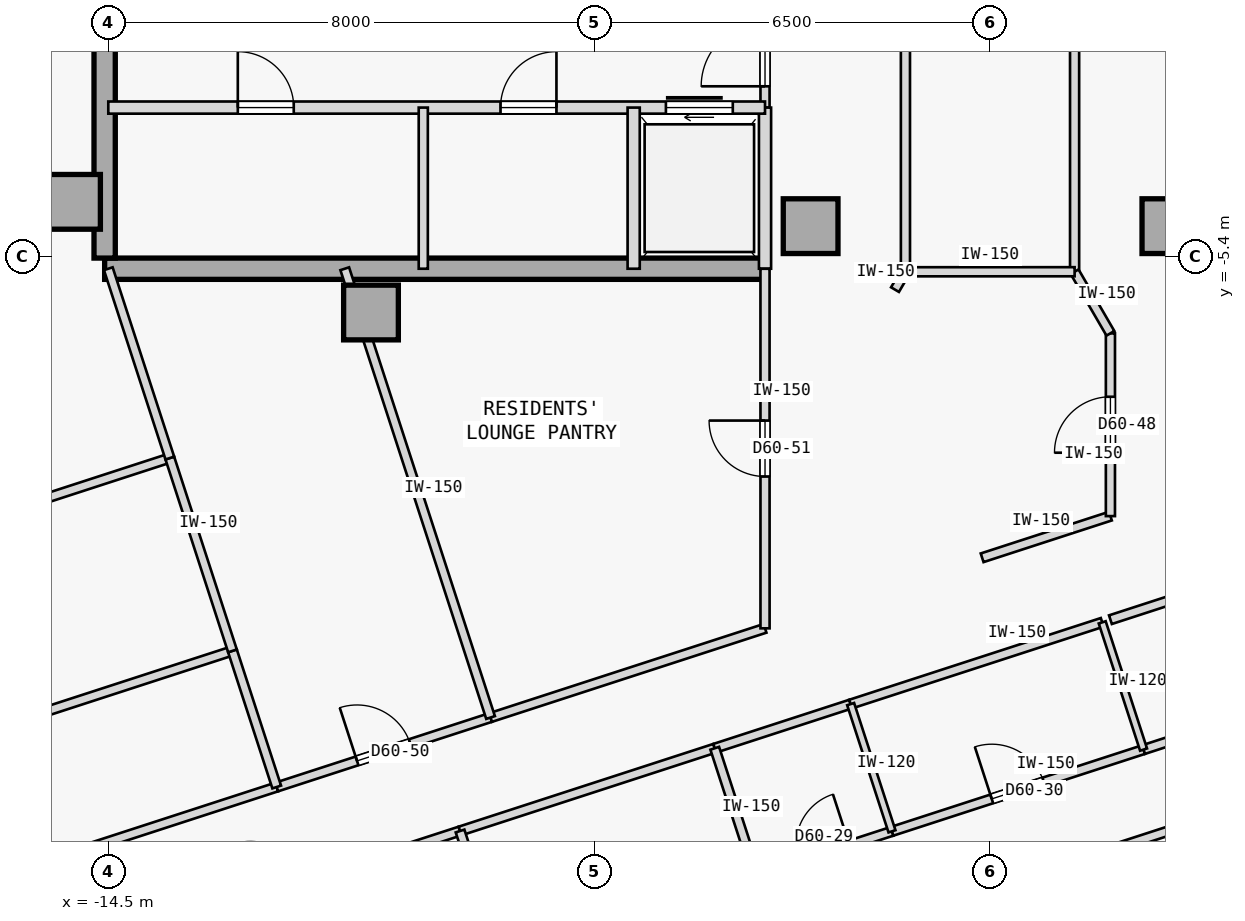
"""IFC4 building model, lengths in metres.
Left out: names, types, materials, properties, quantities, classifications, styles, units other than length and angle.
Written with IfcOpenShell. Run it as: python <this file> out.ifc"""

import sys

from ifc_helpers import new_model, si_unit, direction, frame, frame_2d, origin, origin_2d, place, context, subcontext, project, spatial, rectangle, extrude, element, fill, save


model = new_model("IFC4")
c1 = context("Model", 3, precision=1e-05, world=origin(), true_north=direction((0.0, 1.0)))
c2 = subcontext(c1, "Body", "Model", "MODEL_VIEW")
j1 = project(units=[si_unit("LENGTHUNIT", "METRE"), si_unit("PLANEANGLEUNIT", "RADIAN")], contexts=[c1])
p1 = place(None, origin())
s1 = spatial("IfcSite", under=j1, at=p1, CompositionType="ELEMENT")
p2 = place(p1, origin())
s2 = spatial("IfcBuilding", under=s1, at=p2, CompositionType="ELEMENT")
p3 = place(p2, frame((0.0, 0.0, 227.65)))
s3 = spatial("IfcBuildingStorey", under=s2, at=p3, CompositionType="ELEMENT", Elevation=227.65)
for number, where, z_axis, x_axis in (
    (1, (-15.08, -4.5, 0.0), (0.0, 0.0, 1.0), (1.0, 0.0, 0.0)),
    (2, (-10.18, -6.32, 0.0), (0.0, 0.0, 1.0), (1.0, 0.0, 0.0)),
    (3, (-2.95, -4.9, 0.0), (0.0, 0.0, 1.0), (1.0, 0.0, 0.0)),
    (4, (2.95, -4.9, 0.0), (0.0, 0.0, 1.0), (1.0, 0.0, 0.0)),
):
    element("IfcColumn", number, at=place(p3, frame(where, z_axis=z_axis, x_axis=x_axis)), inside=s3, PredefinedType="COLUMN", context=c2, shape_type="SweptSolid", body=[
        extrude(rectangle(XDim=0.9, YDim=0.9, at=origin_2d()), origin(), (0.0, 0.0, 1.0), 3.35),
    ])
p4 = place(p3, frame((-14.56, -5.6, 0.0), z_axis=(0.0, 0.0, 1.0), x_axis=(1.0, 0.0, 0.0)))
e5 = element("IfcWall", 5, at=p4, inside=s3, PredefinedType="SHEAR", context=c2, shape_type="SweptSolid", body=[
    extrude(rectangle(XDim=10.86, YDim=0.35, at=frame_2d((5.43, 0.0))), origin(), (0.0, 0.0, 1.0), 3.125),
])
p5 = place(p3, frame((-14.56, -5.425, 0.0), z_axis=(0.0, 0.0, 1.0), x_axis=(0.0, 1.0, 0.0)))
e6 = element("IfcWall", 6, at=p5, inside=s3, PredefinedType="SHEAR", context=c2, shape_type="SweptSolid", body=[
    extrude(rectangle(XDim=10.85, YDim=0.35, at=frame_2d((5.425, 0.0))), origin(), (0.0, 0.0, 1.0), 3.125),
])
p6 = place(p3, frame((-3.7, -2.95, 0.0), z_axis=(0.0, 0.0, 1.0), x_axis=(0.0, 1.0, 0.0)))
e7 = element("IfcWall", 7, at=p6, inside=s3, PredefinedType="PARTITIONING", context=c2, shape_type="SweptSolid", body=[
    extrude(rectangle(XDim=1.8, YDim=0.15, at=frame_2d((0.9, 0.0))), origin(), (0.0, 0.0, 1.0), 3.125),
])
p7 = place(p6, frame((0.35, 0.0, 0.0)))
e8 = element("IfcOpeningElement", 8, at=p7, cuts=e7, PredefinedType="OPENING", context=c2, shape_type="SweptSolid", body=[
    extrude(rectangle(XDim=1.05, YDim=2.18, at=frame_2d((0.525, 1.09))), frame((0.0, 0.085, 0.0), z_axis=(0.0, -1.0, 0.0), x_axis=(1.0, 0.0, 0.0)), (0.0, 0.0, 1.0), 0.17),
])
p8 = place(p3, frame((-3.7, -5.6, 0.0), z_axis=(0.0, 0.0, 1.0), x_axis=(0.0, 1.0, 0.0)))
e9 = element("IfcWall", 9, at=p8, inside=s3, PredefinedType="STANDARD", context=c2, shape_type="SweptSolid", body=[
    extrude(rectangle(XDim=2.65, YDim=0.2, at=frame_2d((1.325, 0.0))), origin(), (0.0, 0.0, 1.0), 3.125),
])
p9 = place(p3, frame((-14.5, -2.95, 0.0), z_axis=(0.0, 0.0, 1.0), x_axis=(1.0, 0.0, 0.0)))
e10 = element("IfcWall", 10, at=p9, inside=s3, PredefinedType="STANDARD", context=c2, shape_type="SweptSolid", body=[
    extrude(rectangle(XDim=10.8, YDim=0.2, at=frame_2d((5.4, 0.0))), origin(), (0.0, 0.0, 1.0), 3.125),
])
p10 = place(p9, frame((9.17, 0.0, 0.0)))
e11 = element("IfcOpeningElement", 11, at=p10, cuts=e10, PredefinedType="OPENING", context=c2, shape_type="SweptSolid", body=[
    extrude(rectangle(XDim=1.1, YDim=2.15, at=frame_2d((0.55, 1.075))), frame((0.0, 0.11, 0.0), z_axis=(0.0, -1.0, 0.0), x_axis=(1.0, 0.0, 0.0)), (0.0, 0.0, 1.0), 0.22),
])
p11 = place(p9, frame((2.13, 0.0, 0.0)))
e12 = element("IfcOpeningElement", 12, at=p11, cuts=e10, PredefinedType="OPENING", context=c2, shape_type="SweptSolid", body=[
    extrude(rectangle(XDim=0.92, YDim=2.15, at=frame_2d((0.46, 1.075))), frame((0.0, 0.11, 0.0), z_axis=(0.0, -1.0, 0.0), x_axis=(1.0, 0.0, 0.0)), (0.0, 0.0, 1.0), 0.22),
])
p12 = place(p9, frame((6.45, 0.0, 0.0)))
e13 = element("IfcOpeningElement", 13, at=p12, cuts=e10, PredefinedType="OPENING", context=c2, shape_type="SweptSolid", body=[
    extrude(rectangle(XDim=0.92, YDim=2.15, at=frame_2d((0.46, 1.075))), frame((0.0, 0.11, 0.0), z_axis=(0.0, -1.0, 0.0), x_axis=(1.0, 0.0, 0.0)), (0.0, 0.0, 1.0), 0.22),
])
p13 = place(p3, frame((-5.86, -5.6, 0.0), z_axis=(0.0, 0.0, 1.0), x_axis=(0.0, 1.0, 0.0)))
e14 = element("IfcWall", 14, at=p13, inside=s3, PredefinedType="STANDARD", context=c2, shape_type="SweptSolid", body=[
    extrude(rectangle(XDim=2.65, YDim=0.2, at=frame_2d((1.325, 0.0))), origin(), (0.0, 0.0, 1.0), 3.125),
])
p14 = place(p3, frame((-9.32, -5.6, 0.0), z_axis=(0.0, 0.0, 1.0), x_axis=(0.0, 1.0, 0.0)))
e15 = element("IfcWall", 15, at=p14, inside=s3, PredefinedType="PARTITIONING", context=c2, shape_type="SweptSolid", body=[
    extrude(rectangle(XDim=2.65, YDim=0.15, at=frame_2d((1.325, 0.0))), origin(), (0.0, 0.0, 1.0), 3.125),
])
p15 = place(p3, frame((-1.391, -5.65, 0.0), z_axis=(0.0, 0.0, 1.0), x_axis=(-8.6422954e-05, 0.999999996266, 0.0)))
e16 = element("IfcWall", 16, at=p15, inside=s3, PredefinedType="PARTITIONING", context=c2, shape_type="SweptSolid", body=[
    extrude(rectangle(XDim=11.3, YDim=0.15, at=frame_2d((5.65, 0.0))), origin(), (0.0, 0.0, 1.0), 3.125),
])
p16 = place(p15, frame((5.175, 0.0, 0.0)))
e17 = element("IfcOpeningElement", 17, at=p16, cuts=e16, PredefinedType="OPENING", context=c2, shape_type="SweptSolid", body=[
    extrude(rectangle(XDim=0.95, YDim=2.15, at=frame_2d((0.475, 1.075))), frame((0.0, 0.085, 0.0), z_axis=(0.0, -1.0, 0.0), x_axis=(1.0, 0.0, 0.0)), (0.0, 0.0, 1.0), 0.17),
])
p17 = place(p3, frame((1.391, -5.648, 0.0), z_axis=(0.0, 0.0, 1.0), x_axis=(-4.3218947e-05, 0.999999999066, 0.0)))
e18 = element("IfcWall", 18, at=p17, inside=s3, PredefinedType="PARTITIONING", context=c2, shape_type="SweptSolid", body=[
    extrude(rectangle(XDim=11.298, YDim=0.15, at=frame_2d((5.649, 0.0))), origin(), (0.0, 0.0, 1.0), 3.125),
])
p18 = place(p3, frame((-14.709, -16.794, 0.0), z_axis=(0.0, 0.0, 1.0), x_axis=(0.951050295235, 0.309036140172, 0.0)))
e19 = element("IfcWall", 19, at=p18, inside=s3, PredefinedType="PARTITIONING", context=c2, shape_type="SweptSolid", body=[
    extrude(rectangle(XDim=6.302, YDim=0.15, at=frame_2d((3.151, 0.0))), origin(), (0.0, 0.0, 1.0), 3.125),
])
p19 = place(p18, frame((2.676, 0.0, 0.0)))
e20 = element("IfcOpeningElement", 20, at=p19, cuts=e19, PredefinedType="OPENING", context=c2, shape_type="SweptSolid", body=[
    extrude(rectangle(XDim=0.95, YDim=2.15, at=frame_2d((0.475, 1.075))), frame((0.0, 0.085, 0.0), z_axis=(0.0, -1.0, 0.0), x_axis=(1.0, 0.0, 0.0)), (0.0, 0.0, 1.0), 0.17),
])
p20 = place(p3, frame((-8.715, -14.847, 0.0), z_axis=(0.0, 0.0, 1.0), x_axis=(0.951061767293, 0.309000832997, 0.0)))
e21 = element("IfcWall", 21, at=p20, inside=s3, PredefinedType="PARTITIONING", context=c2, shape_type="SweptSolid", body=[
    extrude(rectangle(XDim=4.404, YDim=0.15, at=frame_2d((2.202, 0.0))), origin(), (0.0, 0.0, 1.0), 3.125),
])
p21 = place(p3, frame((-4.527, -13.486, 0.0), z_axis=(0.0, 0.0, 1.0), x_axis=(0.951045519245, 0.309050837767, 0.0)))
e22 = element("IfcWall", 22, at=p21, inside=s3, PredefinedType="PARTITIONING", context=c2, shape_type="SweptSolid", body=[
    extrude(rectangle(XDim=2.35, YDim=0.15, at=frame_2d((1.175, 0.0))), origin(), (0.0, 0.0, 1.0), 3.125),
])
p22 = place(p3, frame((-2.292, -12.76, 0.0), z_axis=(0.0, 0.0, 1.0), x_axis=(0.951052627573, 0.309028962374, 0.0)))
e23 = element("IfcWall", 23, at=p22, inside=s3, PredefinedType="PARTITIONING", context=c2, shape_type="SweptSolid", body=[
    extrude(rectangle(XDim=4.35, YDim=0.15, at=frame_2d((2.175, 0.0))), origin(), (0.0, 0.0, 1.0), 3.125),
])
p23 = place(p3, frame((1.98, -11.372, 0.0), z_axis=(0.0, 0.0, 1.0), x_axis=(0.951047958247, 0.309043332098, 0.0)))
e24 = element("IfcWall", 24, at=p23, inside=s3, PredefinedType="PARTITIONING", context=c2, shape_type="SweptSolid", body=[
    extrude(rectangle(XDim=3.358, YDim=0.15, at=frame_2d((1.679, 0.0))), origin(), (0.0, 0.0, 1.0), 3.125),
])
p24 = place(p3, frame((-29.45, -19.881, 0.0), z_axis=(0.0, 0.0, 1.0), x_axis=(0.95105650271, 0.309017036186, 0.0)))
e25 = element("IfcWall", 25, at=p24, inside=s3, PredefinedType="PARTITIONING", context=c2, shape_type="SweptSolid", body=[
    extrude(rectangle(XDim=18.632, YDim=0.15, at=frame_2d((9.316, 0.0))), origin(), (0.0, 0.0, 1.0), 3.125),
])
p25 = place(p24, frame((8.856, 0.0, 0.0)))
e26 = element("IfcOpeningElement", 26, at=p25, cuts=e25, PredefinedType="OPENING", context=c2, shape_type="SweptSolid", body=[
    extrude(rectangle(XDim=0.92, YDim=2.15, at=frame_2d((0.46, 1.075))), frame((0.0, 0.085, 0.0), z_axis=(0.0, -1.0, 0.0), x_axis=(1.0, 0.0, 0.0)), (0.0, 0.0, 1.0), 0.17),
])
p26 = place(p3, frame((-0.129, -10.354, 0.0), z_axis=(0.0, 0.0, 1.0), x_axis=(0.951066420845, 0.308986509643, 0.0)))
e27 = element("IfcWall", 27, at=p26, inside=s3, PredefinedType="PARTITIONING", context=c2, shape_type="SweptSolid", body=[
    extrude(rectangle(XDim=2.218, YDim=0.15, at=frame_2d((1.109, 0.0))), origin(), (0.0, 0.0, 1.0), 3.125),
])
p27 = place(p3, frame((-1.562, -5.944, 0.0), z_axis=(0.0, 0.0, 1.0), x_axis=(0.505387839696, 0.862892305845, 0.0)))
e28 = element("IfcWall", 28, at=p27, inside=s3, PredefinedType="PARTITIONING", context=c2, shape_type="SweptSolid", body=[
    extrude(rectangle(XDim=0.34, YDim=0.15, at=frame_2d((0.17, 0.0))), origin(), (0.0, 0.0, 1.0), 3.125),
])
p28 = place(p3, frame((1.98, -9.668, 0.0), z_axis=(0.0, 0.0, 1.0), x_axis=(8.1241368e-05, 0.9999999967, 0.0)))
e29 = element("IfcWall", 29, at=p28, inside=s3, PredefinedType="PARTITIONING", context=c2, shape_type="SweptSolid", body=[
    extrude(rectangle(XDim=3.005, YDim=0.15, at=frame_2d((1.502, 0.0))), origin(), (0.0, 0.0, 1.0), 3.125),
])
p29 = place(p28, frame((1.042, 0.0, 0.0)))
e30 = element("IfcOpeningElement", 30, at=p29, cuts=e29, PredefinedType="OPENING", context=c2, shape_type="SweptSolid", body=[
    extrude(rectangle(XDim=0.92, YDim=2.15, at=frame_2d((0.46, 1.075))), frame((0.0, 0.085, 0.0), z_axis=(0.0, -1.0, 0.0), x_axis=(1.0, 0.0, 0.0)), (0.0, 0.0, 1.0), 0.17),
])
p30 = place(p3, frame((1.391, -5.649, 0.0), z_axis=(0.0, 0.0, 1.0), x_axis=(0.502522642426, -0.864564048437, 0.0)))
e31 = element("IfcWall", 31, at=p30, inside=s3, PredefinedType="PARTITIONING", context=c2, shape_type="SweptSolid", body=[
    extrude(rectangle(XDim=1.171, YDim=0.15, at=frame_2d((0.586, 0.0))), origin(), (0.0, 0.0, 1.0), 3.125),
])
p31 = place(p3, frame((-11.73, -14.123, 0.0), z_axis=(0.0, 0.0, 1.0), x_axis=(0.951052502763, 0.309029346483, 0.0)))
e32 = element("IfcWall", 32, at=p31, inside=s3, PredefinedType="PARTITIONING", context=c2, shape_type="SweptSolid", body=[
    extrude(rectangle(XDim=3.698, YDim=0.15, at=frame_2d((1.849, 0.0))), origin(), (0.0, 0.0, 1.0), 3.125),
])
p32 = place(p31, frame((1.389, 0.0, 0.0)))
e33 = element("IfcOpeningElement", 33, at=p32, cuts=e32, PredefinedType="OPENING", context=c2, shape_type="SweptSolid", body=[
    extrude(rectangle(XDim=0.92, YDim=2.15, at=frame_2d((0.46, 1.075))), frame((0.0, 0.085, 0.0), z_axis=(0.0, -1.0, 0.0), x_axis=(1.0, 0.0, 0.0)), (0.0, 0.0, 1.0), 0.17),
])
p33 = place(p3, frame((-8.213, -12.98, 0.0), z_axis=(0.0, 0.0, 1.0), x_axis=(0.951058260096, 0.309011627456, 0.0)))
e34 = element("IfcWall", 34, at=p33, inside=s3, PredefinedType="PARTITIONING", context=c2, shape_type="SweptSolid", body=[
    extrude(rectangle(XDim=4.746, YDim=0.15, at=frame_2d((2.373, 0.0))), origin(), (0.0, 0.0, 1.0), 3.125),
])
p34 = place(p3, frame((-3.7, -11.514, 0.0), z_axis=(0.0, 0.0, 1.0), x_axis=(-8.2572974e-05, 0.999999996591, 0.0)))
e35 = element("IfcWall", 35, at=p34, inside=s3, PredefinedType="PARTITIONING", context=c2, shape_type="SweptSolid", body=[
    extrude(rectangle(XDim=5.913, YDim=0.15, at=frame_2d((2.957, 0.0))), origin(), (0.0, 0.0, 1.0), 3.125),
])
p35 = place(p34, frame((2.497, 0.0, 0.0)))
e36 = element("IfcOpeningElement", 36, at=p35, cuts=e35, PredefinedType="OPENING", context=c2, shape_type="SweptSolid", body=[
    extrude(rectangle(XDim=0.92, YDim=2.15, at=frame_2d((0.46, 1.075))), frame((0.0, 0.085, 0.0), z_axis=(0.0, -1.0, 0.0), x_axis=(1.0, 0.0, 0.0)), (0.0, 0.0, 1.0), 0.17),
])
p36 = place(p3, frame((-1.391, -5.65, 0.0), z_axis=(0.0, 0.0, 1.0), x_axis=(0.999999965344, 0.000263273356, 0.0)))
e37 = element("IfcWall", 37, at=p36, inside=s3, PredefinedType="PARTITIONING", context=c2, shape_type="SweptSolid", body=[
    extrude(rectangle(XDim=2.782, YDim=0.15, at=frame_2d((1.391, 0.0))), origin(), (0.0, 0.0, 1.0), 3.125),
])
p37 = place(p3, frame((-5.668, -24.226, 0.0), z_axis=(0.0, 0.0, 1.0), x_axis=(-0.309022258842, 0.95105480575, 0.0)))
e38 = element("IfcWall", 38, at=p37, inside=s3, PredefinedType="PARTITIONING", context=c2, shape_type="SweptSolid", body=[
    extrude(rectangle(XDim=9.862, YDim=0.15, at=frame_2d((4.931, 0.0))), origin(), (0.0, 0.0, 1.0), 3.125),
])
p38 = place(p3, frame((-3.847, -15.578, 0.0), z_axis=(0.0, 0.0, 1.0), x_axis=(-0.309060979314, 0.951042223598, 0.0)))
e39 = element("IfcWall", 39, at=p38, inside=s3, PredefinedType="PARTITIONING", context=c2, shape_type="SweptSolid", body=[
    extrude(rectangle(XDim=2.2, YDim=0.15, at=frame_2d((1.1, 0.0))), origin(), (0.0, 0.0, 1.0), 3.125),
])
p39 = place(p3, frame((-3.847, -15.578, 0.0), z_axis=(0.0, 0.0, 1.0), x_axis=(0.951035595692, 0.309081373955, 0.0)))
e40 = element("IfcWall", 40, at=p39, inside=s3, PredefinedType="PARTITIONING", context=c2, shape_type="SweptSolid", body=[
    extrude(rectangle(XDim=2.35, YDim=0.15, at=frame_2d((1.175, 0.0))), origin(), (0.0, 0.0, 1.0), 3.125),
])
p40 = place(p39, frame((0.735, 0.0, 0.0)))
e41 = element("IfcOpeningElement", 41, at=p40, cuts=e40, PredefinedType="OPENING", context=c2, shape_type="SweptSolid", body=[
    extrude(rectangle(XDim=0.88, YDim=2.15, at=frame_2d((0.44, 1.075))), frame((0.0, 0.085, 0.0), z_axis=(0.0, -1.0, 0.0), x_axis=(1.0, 0.0, 0.0)), (0.0, 0.0, 1.0), 0.17),
])
p41 = place(p3, frame((-1.612, -14.852, 0.0), z_axis=(0.0, 0.0, 1.0), x_axis=(0.951074479912, 0.30896170258, 0.0)))
e42 = element("IfcWall", 42, at=p41, inside=s3, PredefinedType="PARTITIONING", context=c2, shape_type="SweptSolid", body=[
    extrude(rectangle(XDim=4.35, YDim=0.15, at=frame_2d((2.175, 0.0))), origin(), (0.0, 0.0, 1.0), 3.125),
])
p42 = place(p41, frame((1.725, 0.0, 0.0)))
e43 = element("IfcOpeningElement", 43, at=p42, cuts=e42, PredefinedType="OPENING", context=c2, shape_type="SweptSolid", body=[
    extrude(rectangle(XDim=0.9, YDim=2.15, at=frame_2d((0.45, 1.075))), frame((0.0, 0.085, 0.0), z_axis=(0.0, -1.0, 0.0), x_axis=(1.0, 0.0, 0.0)), (0.0, 0.0, 1.0), 0.17),
])
p43 = place(p3, frame((2.525, -13.508, 0.0), z_axis=(0.0, 0.0, 1.0), x_axis=(0.95103509395, 0.3090829178, 0.0)))
e44 = element("IfcWall", 44, at=p43, inside=s3, PredefinedType="PARTITIONING", context=c2, shape_type="SweptSolid", body=[
    extrude(rectangle(XDim=3.5, YDim=0.15, at=frame_2d((1.75, 0.0))), origin(), (0.0, 0.0, 1.0), 3.125),
])
p44 = place(p43, frame((1.31, 0.0, 0.0)))
e45 = element("IfcOpeningElement", 45, at=p44, cuts=e44, PredefinedType="OPENING", context=c2, shape_type="SweptSolid", body=[
    extrude(rectangle(XDim=0.88, YDim=2.15, at=frame_2d((0.44, 1.075))), frame((0.0, 0.085, 0.0), z_axis=(0.0, -1.0, 0.0), x_axis=(1.0, 0.0, 0.0)), (0.0, 0.0, 1.0), 0.17),
])
p45 = place(p3, frame((1.337, -15.366, 0.0), z_axis=(0.0, 0.0, 1.0), x_axis=(0.951050272606, 0.309036209813, 0.0)))
e46 = element("IfcWall", 46, at=p45, inside=s3, PredefinedType="PARTITIONING", context=c2, shape_type="SweptSolid", body=[
    extrude(rectangle(XDim=4.65, YDim=0.15, at=frame_2d((2.325, 0.0))), origin(), (0.0, 0.0, 1.0), 3.125),
])
p46 = place(p3, frame((-1.612, -14.852, 0.0), z_axis=(0.0, 0.0, 1.0), x_axis=(-0.308960600764, 0.951074837842, 0.0)))
e47 = element("IfcWall", 47, at=p46, inside=s3, PredefinedType="PARTITIONING", context=c2, shape_type="SweptSolid", body=[
    extrude(rectangle(XDim=2.2, YDim=0.12, at=frame_2d((1.1, 0.0))), origin(), (0.0, 0.0, 1.0), 3.125),
])
p47 = place(p3, frame((2.525, -13.508, 0.0), z_axis=(0.0, 0.0, 1.0), x_axis=(-0.309028364152, 0.951052821956, 0.0)))
e48 = element("IfcWall", 48, at=p47, inside=s3, PredefinedType="PARTITIONING", context=c2, shape_type="SweptSolid", body=[
    extrude(rectangle(XDim=2.2, YDim=0.12, at=frame_2d((1.1, 0.0))), origin(), (0.0, 0.0, 1.0), 3.125),
])
p48 = place(p3, frame((-30.178, -17.642, 0.0), z_axis=(0.0, 0.0, 1.0), x_axis=(0.95105650271, 0.309017036186, 0.0)))
e49 = element("IfcWall", 49, at=p48, inside=s3, PredefinedType="PARTITIONING", context=c2, shape_type="SweptSolid", body=[
    extrude(rectangle(XDim=18.632, YDim=0.15, at=frame_2d((9.316, 0.0))), origin(), (0.0, 0.0, 1.0), 3.125),
])
p49 = place(p48, frame((8.856, 0.0, 0.0)))
e50 = element("IfcOpeningElement", 50, at=p49, cuts=e49, PredefinedType="OPENING", context=c2, shape_type="SweptSolid", body=[
    extrude(rectangle(XDim=0.92, YDim=2.15, at=frame_2d((0.46, 1.075))), frame((0.0, 0.085, 0.0), z_axis=(0.0, -1.0, 0.0), x_axis=(1.0, 0.0, 0.0)), (0.0, 0.0, 1.0), 0.17),
])
p50 = place(p3, frame((-11.73, -14.123, 0.0), z_axis=(0.0, 0.0, 1.0), x_axis=(-0.309062621189, 0.951041690035, 0.0)))
e51 = element("IfcWall", 51, at=p50, inside=s3, PredefinedType="PARTITIONING", context=c2, shape_type="SweptSolid", body=[
    extrude(rectangle(XDim=2.354, YDim=0.15, at=frame_2d((1.177, 0.0))), origin(), (0.0, 0.0, 1.0), 3.125),
])
p51 = place(p3, frame((-31.208, -14.471, 0.0), z_axis=(0.0, 0.0, 1.0), x_axis=(0.951057753948, 0.309013185244, 0.0)))
e52 = element("IfcWall", 52, at=p51, inside=s3, PredefinedType="PARTITIONING", context=c2, shape_type="SweptSolid", body=[
    extrude(rectangle(XDim=18.632, YDim=0.15, at=frame_2d((9.316, 0.0))), origin(), (0.0, 0.0, 1.0), 3.125),
])
p52 = place(p3, frame((-12.458, -11.884, 0.0), z_axis=(0.0, 0.0, 1.0), x_axis=(-0.308946982245, 0.951079261766, 0.0)))
e53 = element("IfcWall", 53, at=p52, inside=s3, PredefinedType="PARTITIONING", context=c2, shape_type="SweptSolid", body=[
    extrude(rectangle(XDim=3.334, YDim=0.15, at=frame_2d((1.667, 0.0))), origin(), (0.0, 0.0, 1.0), 3.125),
])
p53 = place(p3, frame((-30.663, -9.757, 0.0), z_axis=(0.0, 0.0, 1.0), x_axis=(0.951058192995, 0.309011833974, 0.0)))
e54 = element("IfcWall", 54, at=p53, inside=s3, PredefinedType="PARTITIONING", context=c2, shape_type="SweptSolid", body=[
    extrude(rectangle(XDim=16.657, YDim=0.15, at=frame_2d((8.329, 0.0))), origin(), (0.0, 0.0, 1.0), 3.125),
])
p54 = place(p3, frame((-13.488, -8.713, 0.0), z_axis=(0.0, 0.0, 1.0), x_axis=(-0.309082700143, 0.951035164687, 0.0)))
e55 = element("IfcWall", 55, at=p54, inside=s3, PredefinedType="PARTITIONING", context=c2, shape_type="SweptSolid", body=[
    extrude(rectangle(XDim=3.274, YDim=0.15, at=frame_2d((1.637, 0.0))), origin(), (0.0, 0.0, 1.0), 3.125),
])
p55 = place(p3, frame((-8.213, -12.98, 0.0), z_axis=(0.0, 0.0, 1.0), x_axis=(-0.309017065592, 0.951056493155, 0.0)))
e56 = element("IfcWall", 56, at=p55, inside=s3, PredefinedType="PARTITIONING", context=c2, shape_type="SweptSolid", body=[
    extrude(rectangle(XDim=7.76, YDim=0.15, at=frame_2d((3.88, 0.0))), origin(), (0.0, 0.0, 1.0), 3.125),
])
p56 = place(p7, origin())
e57 = element("IfcDoor", 57, at=p56, inside=s3, OperationType="SINGLE_SWING_LEFT", PredefinedType="DOOR", context=c2, shape_type="SweptSolid", body=[
    extrude(rectangle(XDim=1.05, YDim=2.18, at=frame_2d((0.525, 1.09))), frame((0.0, 0.025, 0.0), z_axis=(0.0, -1.0, 0.0), x_axis=(1.0, 0.0, 0.0)), (0.0, 0.0, 1.0), 0.05),
])
fill(e8, e57)
p57 = place(p10, origin())
e58 = element("IfcDoor", 58, at=p57, inside=s3, OperationType="SLIDING_TO_RIGHT", PredefinedType="DOOR", context=c2, shape_type="SweptSolid", body=[
    extrude(rectangle(XDim=1.1, YDim=2.15, at=frame_2d((0.55, 1.075))), frame((0.0, 0.025, 0.0), z_axis=(0.0, -1.0, 0.0), x_axis=(1.0, 0.0, 0.0)), (0.0, 0.0, 1.0), 0.05),
])
fill(e11, e58)
p58 = place(p11, origin())
e59 = element("IfcDoor", 59, at=p58, inside=s3, OperationType="SINGLE_SWING_LEFT", PredefinedType="DOOR", context=c2, shape_type="SweptSolid", body=[
    extrude(rectangle(XDim=0.92, YDim=2.15, at=frame_2d((0.46, 1.075))), frame((0.0, 0.025, 0.0), z_axis=(0.0, -1.0, 0.0), x_axis=(1.0, 0.0, 0.0)), (0.0, 0.0, 1.0), 0.05),
])
fill(e12, e59)
p59 = place(p12, origin())
e60 = element("IfcDoor", 60, at=p59, inside=s3, OperationType="SINGLE_SWING_RIGHT", PredefinedType="DOOR", context=c2, shape_type="SweptSolid", body=[
    extrude(rectangle(XDim=0.92, YDim=2.15, at=frame_2d((0.46, 1.075))), frame((0.0, 0.025, 0.0), z_axis=(0.0, -1.0, 0.0), x_axis=(1.0, 0.0, 0.0)), (0.0, 0.0, 1.0), 0.05),
])
fill(e13, e60)
p60 = place(p42, origin())
e61 = element("IfcDoor", 61, at=p60, inside=s3, OperationType="SINGLE_SWING_LEFT", PredefinedType="DOOR", context=c2, shape_type="SweptSolid", body=[
    extrude(rectangle(XDim=0.9, YDim=2.15, at=frame_2d((0.45, 1.075))), frame((0.0, 0.025, 0.0), z_axis=(0.0, -1.0, 0.0), x_axis=(1.0, 0.0, 0.0)), (0.0, 0.0, 1.0), 0.05),
])
fill(e43, e61)
p61 = place(p29, origin())
e62 = element("IfcDoor", 62, at=p61, inside=s3, OperationType="SINGLE_SWING_LEFT", PredefinedType="DOOR", context=c2, shape_type="SweptSolid", body=[
    extrude(rectangle(XDim=0.92, YDim=2.15, at=frame_2d((0.46, 1.075))), frame((0.0, 0.025, 0.0), z_axis=(0.0, -1.0, 0.0), x_axis=(1.0, 0.0, 0.0)), (0.0, 0.0, 1.0), 0.05),
])
fill(e30, e62)
p62 = place(p32, origin())
e63 = element("IfcDoor", 63, at=p62, inside=s3, OperationType="SINGLE_SWING_LEFT", PredefinedType="DOOR", context=c2, shape_type="SweptSolid", body=[
    extrude(rectangle(XDim=0.92, YDim=2.15, at=frame_2d((0.46, 1.075))), frame((0.0, 0.025, 0.0), z_axis=(0.0, -1.0, 0.0), x_axis=(1.0, 0.0, 0.0)), (0.0, 0.0, 1.0), 0.05),
])
fill(e33, e63)
p63 = place(p35, origin())
e64 = element("IfcDoor", 64, at=p63, inside=s3, OperationType="SINGLE_SWING_RIGHT", PredefinedType="DOOR", context=c2, shape_type="SweptSolid", body=[
    extrude(rectangle(XDim=0.92, YDim=2.15, at=frame_2d((0.46, 1.075))), frame((0.0, 0.025, 0.0), z_axis=(0.0, -1.0, 0.0), x_axis=(1.0, 0.0, 0.0)), (0.0, 0.0, 1.0), 0.05),
])
fill(e36, e64)
save(model, sys.argv[1])
